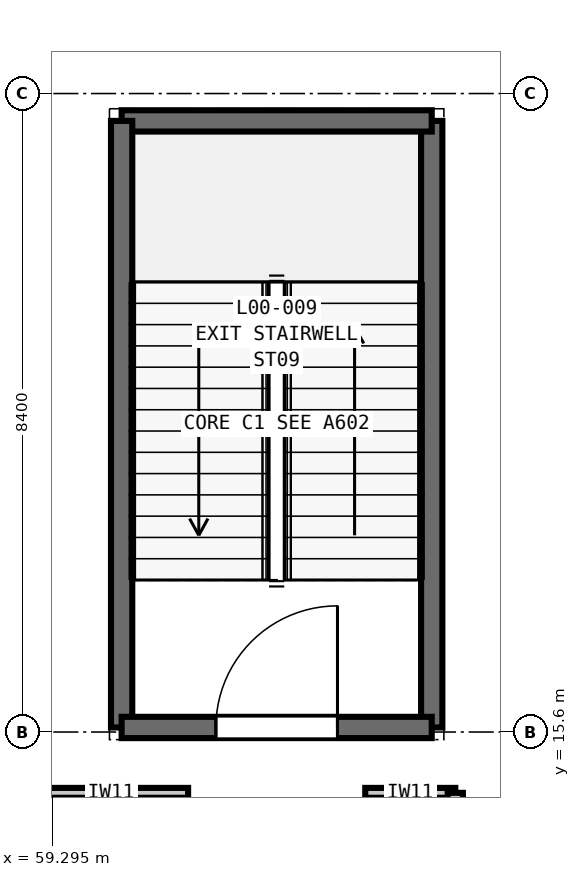
"""IFC4 building model, lengths in metres.
Left out: names, types, materials, properties, quantities, classifications, styles, units other than length and angle.
Written with IfcOpenShell. Run it as: python <this file> out.ifc"""

import sys

from ifc_helpers import new_model, si_unit, direction, frame, frame_2d, origin, place, context, subcontext, project, spatial, rectangle, extrude, element, fill, save


model = new_model("IFC4")
c1 = context("Model", 3, precision=1e-05, world=origin(), true_north=direction((0.0, 1.0)))
c2 = subcontext(c1, "Body", "Model", "MODEL_VIEW")
j1 = project(units=[si_unit("LENGTHUNIT", "METRE"), si_unit("PLANEANGLEUNIT", "RADIAN")], contexts=[c1])
p1 = place(None, origin())
s1 = spatial("IfcSite", under=j1, at=p1, CompositionType="ELEMENT")
p2 = place(p1, origin())
s2 = spatial("IfcBuilding", under=s1, at=p2, CompositionType="ELEMENT")
p3 = place(p2, origin())
s3 = spatial("IfcBuildingStorey", under=s2, at=p3, CompositionType="ELEMENT", Elevation=0.0)
p4 = place(p3, frame((64.29, 15.66, 0.0), z_axis=(0.0, 0.0, 1.0), x_axis=(0.0, 1.0, 0.0)))
e1 = element("IfcWall", 1, at=p4, inside=s3, PredefinedType="SHEAR", context=c2, shape_type="SweptSolid", body=[
    extrude(rectangle(XDim=7.98, YDim=0.28, at=frame_2d((3.99, 0.0))), origin(), (0.0, 0.0, 1.0), 5.4),
])
p5 = place(p3, frame((64.29, 23.64, 0.0), z_axis=(0.0, 0.0, 1.0), x_axis=(-1.0, 0.0, 0.0)))
e2 = element("IfcWall", 2, at=p5, inside=s3, PredefinedType="SHEAR", context=c2, shape_type="SweptSolid", body=[
    extrude(rectangle(XDim=4.08, YDim=0.28, at=frame_2d((2.04, 0.0))), origin(), (0.0, 0.0, 1.0), 5.4),
])
p6 = place(p3, frame((60.21, 23.64, 0.0), z_axis=(0.0, 0.0, 1.0), x_axis=(0.0, -1.0, 0.0)))
e3 = element("IfcWall", 3, at=p6, inside=s3, PredefinedType="SHEAR", context=c2, shape_type="SweptSolid", body=[
    extrude(rectangle(XDim=7.98, YDim=0.28, at=frame_2d((3.99, 0.0))), origin(), (0.0, 0.0, 1.0), 5.4),
])
p7 = place(p3, frame((60.21, 15.66, 0.0), z_axis=(0.0, 0.0, 1.0), x_axis=(1.0, 0.0, 0.0)))
e4 = element("IfcWall", 4, at=p7, inside=s3, PredefinedType="SHEAR", context=c2, shape_type="SweptSolid", body=[
    extrude(rectangle(XDim=4.08, YDim=0.28, at=frame_2d((2.04, 0.0))), origin(), (0.0, 0.0, 1.0), 5.4),
])
p8 = place(p7, frame((1.24, 0.0, 0.0)))
e5 = element("IfcOpeningElement", 5, at=p8, cuts=e4, PredefinedType="OPENING", context=c2, shape_type="SweptSolid", body=[
    extrude(rectangle(XDim=1.6, YDim=2.25, at=frame_2d((0.8, 1.125))), frame((0.0, 0.15, 0.0), z_axis=(0.0, -1.0, 0.0), x_axis=(1.0, 0.0, 0.0)), (0.0, 0.0, 1.0), 0.3),
])
p9 = place(p3, frame((59.06, 14.8, 0.0), z_axis=(0.0, 0.0, 1.0), x_axis=(1.0, 0.0, 0.0)))
e6 = element("IfcWall", 6, at=p9, inside=s3, PredefinedType="PARTITIONING", context=c2, shape_type="SweptSolid", body=[
    extrude(rectangle(XDim=2.025, YDim=0.13, at=frame_2d((1.012, 0.0))), origin(), (0.0, 0.0, 1.0), 5.04),
])
p10 = place(p3, frame((63.415, 14.8, 0.0), z_axis=(0.0, 0.0, 1.0), x_axis=(1.0, 0.0, 0.0)))
e7 = element("IfcWall", 7, at=p10, inside=s3, PredefinedType="PARTITIONING", context=c2, shape_type="SweptSolid", body=[
    extrude(rectangle(XDim=1.185, YDim=0.13, at=frame_2d((0.592, 0.0))), origin(), (0.0, 0.0, 1.0), 5.04),
])
p11 = place(p3, frame((64.6, 7.6, 0.0), z_axis=(0.0, 0.0, 1.0), x_axis=(0.0, 1.0, 0.0)))
e8 = element("IfcWall", 8, at=p11, inside=s3, PredefinedType="PARTITIONING", context=c2, shape_type="SweptSolid", body=[
    extrude(rectangle(XDim=7.2, YDim=0.2, at=frame_2d((3.6, 0.0))), origin(), (0.0, 0.0, 1.0), 5.04),
])
p12 = place(p11, frame((2.675, 0.0, 0.0)))
e9 = element("IfcOpeningElement", 9, at=p12, cuts=e8, PredefinedType="OPENING", context=c2, shape_type="SweptSolid", body=[
    extrude(rectangle(XDim=1.85, YDim=2.3, at=frame_2d((0.925, 1.15))), frame((0.0, 0.11, 0.0), z_axis=(0.0, -1.0, 0.0), x_axis=(1.0, 0.0, 0.0)), (0.0, 0.0, 1.0), 0.22),
])
p13 = place(p8, origin())
e10 = element("IfcDoor", 10, at=p13, inside=s3, OperationType="SINGLE_SWING_RIGHT", PredefinedType="DOOR", context=c2, shape_type="SweptSolid", body=[
    extrude(rectangle(XDim=1.6, YDim=2.25, at=frame_2d((0.8, 1.125))), frame((0.0, 0.025, 0.0), z_axis=(0.0, -1.0, 0.0), x_axis=(1.0, 0.0, 0.0)), (0.0, 0.0, 1.0), 0.05),
])
fill(e5, e10)
save(model, sys.argv[1])
